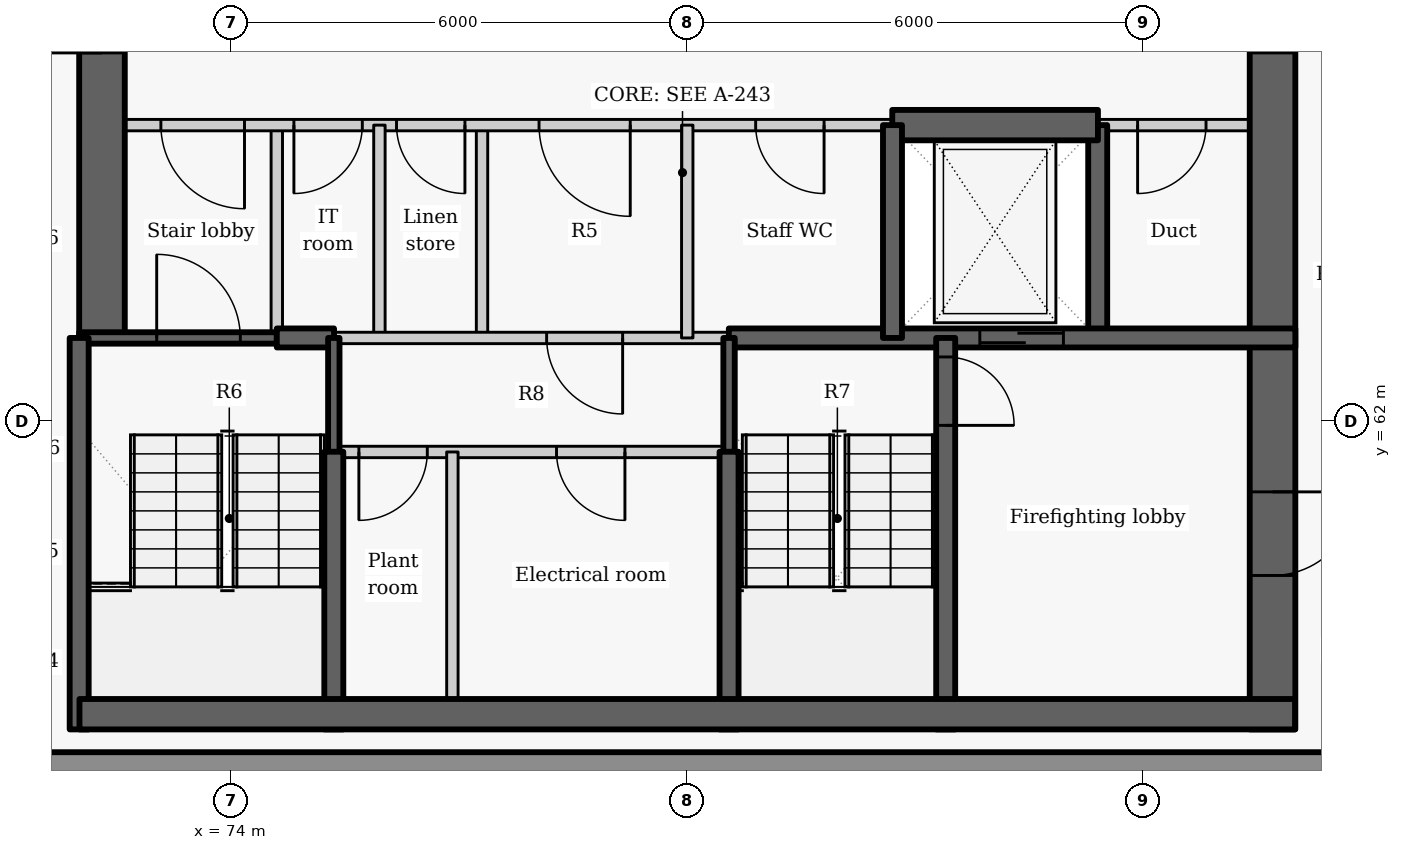
"""IFC4 building model, lengths in metres.
Left out: names, types, materials, properties, quantities, classifications, styles, units other than length and angle.
Written with IfcOpenShell. Run it as: python <this file> out.ifc"""

import sys

from ifc_helpers import new_model, si_unit, direction, frame, frame_2d, origin, place, context, subcontext, project, spatial, rectangle, extrude, element, fill, save


model = new_model("IFC4")
c1 = context("Model", 3, precision=1e-05, world=origin(), true_north=direction((0.0, 1.0)))
c2 = subcontext(c1, "Body", "Model", "MODEL_VIEW")
j1 = project(units=[si_unit("LENGTHUNIT", "METRE"), si_unit("PLANEANGLEUNIT", "RADIAN")], contexts=[c1])
p1 = place(None, origin())
s1 = spatial("IfcSite", under=j1, at=p1, CompositionType="ELEMENT")
p2 = place(p1, origin())
s2 = spatial("IfcBuilding", under=s1, at=p2, CompositionType="ELEMENT")
p3 = place(p2, frame((0.0, 0.0, 259.2)))
s3 = spatial("IfcBuildingStorey", under=s2, at=p3, CompositionType="ELEMENT", Elevation=259.2)
p4 = place(p3, frame((70.501, 57.5, 0.0), z_axis=(0.0, 0.0, 1.0), x_axis=(1.0, 0.0, 0.0)))
e1 = element("IfcWall", 1, at=p4, inside=s3, PredefinedType="SOLIDWALL", context=c2, shape_type="SweptSolid", body=[
    extrude(rectangle(XDim=18.993, YDim=0.3, at=frame_2d((9.496, 0.0))), origin(), (0.0, 0.0, 1.0), 2.425),
])
p5 = place(p3, frame((74.6, 63.1, 0.0), z_axis=(0.0, 0.0, 1.0), x_axis=(0.0, 1.0, 0.0)))
e2 = element("IfcWall", 2, at=p5, inside=s3, PredefinedType="PARTITIONING", context=c2, shape_type="SweptSolid", body=[
    extrude(rectangle(XDim=2.8, YDim=0.15, at=frame_2d((1.4, 0.0))), origin(), (0.0, 0.0, 1.0), 3.025),
])
p6 = place(p3, frame((72.3, 63.1, -0.275), z_axis=(0.0, 0.0, 1.0), x_axis=(0.0, 1.0, 0.0)))
e3 = element("IfcWall", 3, at=p6, inside=s3, PredefinedType="SHEAR", context=c2, shape_type="SweptSolid", body=[
    extrude(rectangle(XDim=9.1, YDim=0.6, at=frame_2d((4.55, 0.0))), origin(), (0.0, 0.0, 1.0), 3.3),
])
p7 = place(p6, frame((3.75, 0.0, 0.275)))
e4 = element("IfcOpeningElement", 4, at=p7, cuts=e3, PredefinedType="OPENING", context=c2, shape_type="SweptSolid", body=[
    extrude(rectangle(XDim=1.5, YDim=2.1, at=frame_2d((0.75, 1.05))), frame((0.0, 0.31, 0.0), z_axis=(0.0, -1.0, 0.0), x_axis=(1.0, 0.0, 0.0)), (0.0, 0.0, 1.0), 0.62),
])
p8 = place(p3, frame((85.4, 63.1, -0.275), z_axis=(0.0, 0.0, 1.0), x_axis=(0.0, 1.0, 0.0)))
e5 = element("IfcWall", 5, at=p8, inside=s3, PredefinedType="SHEAR", context=c2, shape_type="SweptSolid", body=[
    extrude(rectangle(XDim=2.8, YDim=0.25, at=frame_2d((1.4, 0.0))), origin(), (0.0, 0.0, 1.0), 3.3),
])
p9 = place(p3, frame((87.7, 72.2, -0.275), z_axis=(0.0, 0.0, 1.0), x_axis=(0.0, -1.0, 0.0)))
e6 = element("IfcWall", 6, at=p9, inside=s3, PredefinedType="SHEAR", context=c2, shape_type="SweptSolid", body=[
    extrude(rectangle(XDim=14.25, YDim=0.6, at=frame_2d((7.125, 0.0))), origin(), (0.0, 0.0, 1.0), 3.3),
])
p10 = place(p9, frame((3.85, 0.0, 0.275)))
e7 = element("IfcOpeningElement", 7, at=p10, cuts=e6, PredefinedType="OPENING", context=c2, shape_type="SweptSolid", body=[
    extrude(rectangle(XDim=1.5, YDim=2.1, at=frame_2d((0.75, 1.05))), frame((0.0, 0.31, 0.0), z_axis=(0.0, -1.0, 0.0), x_axis=(1.0, 0.0, 0.0)), (0.0, 0.0, 1.0), 0.62),
])
p11 = place(p9, frame((11.125, 0.0, 0.275)))
e8 = element("IfcOpeningElement", 8, at=p11, cuts=e6, PredefinedType="OPENING", context=c2, shape_type="SweptSolid", body=[
    extrude(rectangle(XDim=1.1, YDim=2.1, at=frame_2d((0.55, 1.05))), frame((0.0, 0.31, 0.0), z_axis=(0.0, -1.0, 0.0), x_axis=(1.0, 0.0, 0.0)), (0.0, 0.0, 1.0), 0.62),
])
p12 = place(p3, frame((77.3, 63.1, 0.0), z_axis=(0.0, 0.0, 1.0), x_axis=(0.0, 1.0, 0.0)))
e9 = element("IfcWall", 9, at=p12, inside=s3, PredefinedType="PARTITIONING", context=c2, shape_type="SweptSolid", body=[
    extrude(rectangle(XDim=2.8, YDim=0.15, at=frame_2d((1.4, 0.0))), origin(), (0.0, 0.0, 1.0), 3.025),
])
p13 = place(p3, frame((82.703, 65.9, 0.0), z_axis=(0.0, 0.0, 1.0), x_axis=(-1.0, 0.0, 0.0)))
e10 = element("IfcWall", 10, at=p13, inside=s3, PredefinedType="PARTITIONING", context=c2, shape_type="SweptSolid", body=[
    extrude(rectangle(XDim=10.703, YDim=0.15, at=frame_2d((5.352, 0.0))), origin(), (0.0, 0.0, 1.0), 3.025),
])
p14 = place(p13, frame((8.528, 0.0, 0.0)))
e11 = element("IfcOpeningElement", 11, at=p14, cuts=e10, PredefinedType="OPENING", context=c2, shape_type="SweptSolid", body=[
    extrude(rectangle(XDim=1.1, YDim=2.1, at=frame_2d((0.55, 1.05))), frame((0.0, 0.085, 0.0), z_axis=(0.0, -1.0, 0.0), x_axis=(1.0, 0.0, 0.0)), (0.0, 0.0, 1.0), 0.17),
])
p15 = place(p13, frame((6.978, 0.0, 0.0)))
e12 = element("IfcOpeningElement", 12, at=p15, cuts=e10, PredefinedType="OPENING", context=c2, shape_type="SweptSolid", body=[
    extrude(rectangle(XDim=0.9, YDim=2.1, at=frame_2d((0.45, 1.05))), frame((0.0, 0.085, 0.0), z_axis=(0.0, -1.0, 0.0), x_axis=(1.0, 0.0, 0.0)), (0.0, 0.0, 1.0), 0.17),
])
p16 = place(p13, frame((5.628, 0.0, 0.0)))
e13 = element("IfcOpeningElement", 13, at=p16, cuts=e10, PredefinedType="OPENING", context=c2, shape_type="SweptSolid", body=[
    extrude(rectangle(XDim=0.9, YDim=2.1, at=frame_2d((0.45, 1.05))), frame((0.0, 0.085, 0.0), z_axis=(0.0, -1.0, 0.0), x_axis=(1.0, 0.0, 0.0)), (0.0, 0.0, 1.0), 0.17),
])
p17 = place(p13, frame((3.453, 0.0, 0.0)))
e14 = element("IfcOpeningElement", 14, at=p17, cuts=e10, PredefinedType="OPENING", context=c2, shape_type="SweptSolid", body=[
    extrude(rectangle(XDim=1.2, YDim=2.1, at=frame_2d((0.6, 1.05))), frame((0.0, 0.085, 0.0), z_axis=(0.0, -1.0, 0.0), x_axis=(1.0, 0.0, 0.0)), (0.0, 0.0, 1.0), 0.17),
])
p18 = place(p13, frame((0.903, 0.0, 0.0)))
e15 = element("IfcOpeningElement", 15, at=p18, cuts=e10, PredefinedType="OPENING", context=c2, shape_type="SweptSolid", body=[
    extrude(rectangle(XDim=0.9, YDim=2.1, at=frame_2d((0.45, 1.05))), frame((0.0, 0.085, 0.0), z_axis=(0.0, -1.0, 0.0), x_axis=(1.0, 0.0, 0.0)), (0.0, 0.0, 1.0), 0.17),
])
p19 = place(p3, frame((88.0, 65.9, 0.0), z_axis=(0.0, 0.0, 1.0), x_axis=(-1.0, 0.0, 0.0)))
e16 = element("IfcWall", 16, at=p19, inside=s3, PredefinedType="PARTITIONING", context=c2, shape_type="SweptSolid", body=[
    extrude(rectangle(XDim=2.603, YDim=0.15, at=frame_2d((1.302, 0.0))), origin(), (0.0, 0.0, 1.0), 3.025),
])
p20 = place(p19, frame((1.175, 0.0, 0.0)))
e17 = element("IfcOpeningElement", 17, at=p20, cuts=e16, PredefinedType="OPENING", context=c2, shape_type="SweptSolid", body=[
    extrude(rectangle(XDim=0.9, YDim=2.1, at=frame_2d((0.45, 1.05))), frame((0.0, 0.085, 0.0), z_axis=(0.0, -1.0, 0.0), x_axis=(1.0, 0.0, 0.0)), (0.0, 0.0, 1.0), 0.17),
])
p21 = place(p3, frame((82.697, 65.9, -0.275), z_axis=(0.0, 0.0, 1.0), x_axis=(1.0, 0.0, 0.0)))
e18 = element("IfcWall", 18, at=p21, inside=s3, PredefinedType="SHEAR", context=c2, shape_type="SweptSolid", body=[
    extrude(rectangle(XDim=2.706, YDim=0.4, at=frame_2d((1.353, 0.0))), origin(), (0.0, 0.0, 1.0), 3.3),
])
p22 = place(p3, frame((72.0, 63.1, -0.275), z_axis=(0.0, 0.0, 1.0), x_axis=(1.0, 0.0, 0.0)))
e19 = element("IfcWall", 19, at=p22, inside=s3, PredefinedType="SHEAR", context=c2, shape_type="SweptSolid", body=[
    extrude(rectangle(XDim=2.6, YDim=0.15, at=frame_2d((1.3, 0.0))), origin(), (0.0, 0.0, 1.0), 3.3),
])
p23 = place(p22, frame((1.02, 0.0, 0.275)))
e20 = element("IfcOpeningElement", 20, at=p23, cuts=e19, PredefinedType="OPENING", context=c2, shape_type="SweptSolid", body=[
    extrude(rectangle(XDim=1.1, YDim=2.1, at=frame_2d((0.55, 1.05))), frame((0.0, 0.085, 0.0), z_axis=(0.0, -1.0, 0.0), x_axis=(1.0, 0.0, 0.0)), (0.0, 0.0, 1.0), 0.17),
])
p24 = place(p3, frame((75.95, 63.1, 0.0), z_axis=(0.0, 0.0, 1.0), x_axis=(0.0, 1.0, 0.0)))
e21 = element("IfcWall", 21, at=p24, inside=s3, PredefinedType="PARTITIONING", context=c2, shape_type="SweptSolid", body=[
    extrude(rectangle(XDim=2.8, YDim=0.15, at=frame_2d((1.4, 0.0))), origin(), (0.0, 0.0, 1.0), 3.025),
])
p25 = place(p3, frame((74.6, 63.1, -0.275), z_axis=(0.0, 0.0, 1.0), x_axis=(1.0, 0.0, 0.0)))
e22 = element("IfcWall", 22, at=p25, inside=s3, PredefinedType="SHEAR", context=c2, shape_type="SweptSolid", body=[
    extrude(rectangle(XDim=0.753, YDim=0.25, at=frame_2d((0.376, 0.0))), origin(), (0.0, 0.0, 1.0), 3.3),
])
p26 = place(p3, frame((80.547, 63.1, -0.275), z_axis=(0.0, 0.0, 1.0), x_axis=(1.0, 0.0, 0.0)))
e23 = element("IfcWall", 23, at=p26, inside=s3, PredefinedType="SHEAR", context=c2, shape_type="SweptSolid", body=[
    extrude(rectangle(XDim=7.453, YDim=0.25, at=frame_2d((3.727, 0.0))), origin(), (0.0, 0.0, 1.0), 3.3),
])
p27 = place(p26, frame((3.302, 0.0, 0.275)))
e24 = element("IfcOpeningElement", 24, at=p27, cuts=e23, PredefinedType="OPENING", context=c2, shape_type="SweptSolid", body=[
    extrude(rectangle(XDim=1.1, YDim=2.1, at=frame_2d((0.55, 1.05))), frame((0.0, 0.135, 0.0), z_axis=(0.0, -1.0, 0.0), x_axis=(1.0, 0.0, 0.0)), (0.0, 0.0, 1.0), 0.27),
])
p28 = place(p3, frame((80.553, 63.1, 0.0), z_axis=(0.0, 0.0, 1.0), x_axis=(-1.0, 0.0, 0.0)))
e25 = element("IfcWall", 25, at=p28, inside=s3, PredefinedType="PARTITIONING", context=c2, shape_type="SweptSolid", body=[
    extrude(rectangle(XDim=5.206, YDim=0.15, at=frame_2d((2.603, 0.0))), origin(), (0.0, 0.0, 1.0), 3.025),
])
p29 = place(p28, frame((1.403, 0.0, 0.0)))
e26 = element("IfcOpeningElement", 26, at=p29, cuts=e25, PredefinedType="OPENING", context=c2, shape_type="SweptSolid", body=[
    extrude(rectangle(XDim=1.0, YDim=2.1, at=frame_2d((0.5, 1.05))), frame((0.0, 0.085, 0.0), z_axis=(0.0, -1.0, 0.0), x_axis=(1.0, 0.0, 0.0)), (0.0, 0.0, 1.0), 0.17),
])
p30 = place(p3, frame((80.0, 63.1, 0.0), z_axis=(0.0, 0.0, 1.0), x_axis=(0.0, 1.0, 0.0)))
e27 = element("IfcWall", 27, at=p30, inside=s3, PredefinedType="PARTITIONING", context=c2, shape_type="SweptSolid", body=[
    extrude(rectangle(XDim=2.8, YDim=0.15, at=frame_2d((1.4, 0.0))), origin(), (0.0, 0.0, 1.0), 3.025),
])
p31 = place(p3, frame((82.7, 63.1, -0.275), z_axis=(0.0, 0.0, 1.0), x_axis=(0.0, 1.0, 0.0)))
e28 = element("IfcWall", 28, at=p31, inside=s3, PredefinedType="SHEAR", context=c2, shape_type="SweptSolid", body=[
    extrude(rectangle(XDim=2.8, YDim=0.25, at=frame_2d((1.4, 0.0))), origin(), (0.0, 0.0, 1.0), 3.3),
])
p32 = place(p3, frame((75.35, 61.597, -0.275), z_axis=(0.0, 0.0, 1.0), x_axis=(0.0, 1.0, 0.0)))
e29 = element("IfcWall", 29, at=p32, inside=s3, PredefinedType="SHEAR", context=c2, shape_type="SweptSolid", body=[
    extrude(rectangle(XDim=1.503, YDim=0.15, at=frame_2d((0.751, 0.0))), origin(), (0.0, 0.0, 1.0), 3.3),
])
p33 = place(p3, frame((75.35, 57.95, -0.275), z_axis=(0.0, 0.0, 1.0), x_axis=(0.0, 1.0, 0.0)))
e30 = element("IfcWall", 30, at=p33, inside=s3, PredefinedType="SHEAR", context=c2, shape_type="SweptSolid", body=[
    extrude(rectangle(XDim=3.653, YDim=0.25, at=frame_2d((1.827, 0.0))), origin(), (0.0, 0.0, 1.0), 3.3),
])
p34 = place(p3, frame((72.0, 57.95, -0.275), z_axis=(0.0, 0.0, 1.0), x_axis=(0.0, 1.0, 0.0)))
e31 = element("IfcWall", 31, at=p34, inside=s3, PredefinedType="SHEAR", context=c2, shape_type="SweptSolid", body=[
    extrude(rectangle(XDim=5.15, YDim=0.25, at=frame_2d((2.575, 0.0))), origin(), (0.0, 0.0, 1.0), 3.3),
])
p35 = place(p3, frame((83.4, 63.1, -0.275), z_axis=(0.0, 0.0, 1.0), x_axis=(0.0, -1.0, 0.0)))
e32 = element("IfcWall", 32, at=p35, inside=s3, PredefinedType="SHEAR", context=c2, shape_type="SweptSolid", body=[
    extrude(rectangle(XDim=5.15, YDim=0.25, at=frame_2d((2.575, 0.0))), origin(), (0.0, 0.0, 1.0), 3.3),
])
p36 = place(p35, frame((0.25, 0.0, 0.275)))
e33 = element("IfcOpeningElement", 33, at=p36, cuts=e32, PredefinedType="OPENING", context=c2, shape_type="SweptSolid", body=[
    extrude(rectangle(XDim=0.9, YDim=2.1, at=frame_2d((0.45, 1.05))), frame((0.0, 0.135, 0.0), z_axis=(0.0, -1.0, 0.0), x_axis=(1.0, 0.0, 0.0)), (0.0, 0.0, 1.0), 0.27),
])
p37 = place(p3, frame((80.55, 61.597, -0.275), z_axis=(0.0, 0.0, 1.0), x_axis=(0.0, 1.0, 0.0)))
e34 = element("IfcWall", 34, at=p37, inside=s3, PredefinedType="SHEAR", context=c2, shape_type="SweptSolid", body=[
    extrude(rectangle(XDim=1.503, YDim=0.15, at=frame_2d((0.751, 0.0))), origin(), (0.0, 0.0, 1.0), 3.3),
])
p38 = place(p3, frame((80.55, 57.95, -0.275), z_axis=(0.0, 0.0, 1.0), x_axis=(0.0, 1.0, 0.0)))
e35 = element("IfcWall", 35, at=p38, inside=s3, PredefinedType="SHEAR", context=c2, shape_type="SweptSolid", body=[
    extrude(rectangle(XDim=3.653, YDim=0.25, at=frame_2d((1.827, 0.0))), origin(), (0.0, 0.0, 1.0), 3.3),
])
p39 = place(p3, frame((80.55, 61.6, 0.0), z_axis=(0.0, 0.0, 1.0), x_axis=(-1.0, 0.0, 0.0)))
e36 = element("IfcWall", 36, at=p39, inside=s3, PredefinedType="PARTITIONING", context=c2, shape_type="SweptSolid", body=[
    extrude(rectangle(XDim=5.2, YDim=0.15, at=frame_2d((2.6, 0.0))), origin(), (0.0, 0.0, 1.0), 3.025),
])
p40 = place(p39, frame((3.97, 0.0, 0.0)))
e37 = element("IfcOpeningElement", 37, at=p40, cuts=e36, PredefinedType="OPENING", context=c2, shape_type="SweptSolid", body=[
    extrude(rectangle(XDim=0.9, YDim=2.1, at=frame_2d((0.45, 1.05))), frame((0.0, 0.085, 0.0), z_axis=(0.0, -1.0, 0.0), x_axis=(1.0, 0.0, 0.0)), (0.0, 0.0, 1.0), 0.17),
])
p41 = place(p39, frame((1.37, 0.0, 0.0)))
e38 = element("IfcOpeningElement", 38, at=p41, cuts=e36, PredefinedType="OPENING", context=c2, shape_type="SweptSolid", body=[
    extrude(rectangle(XDim=0.9, YDim=2.1, at=frame_2d((0.45, 1.05))), frame((0.0, 0.085, 0.0), z_axis=(0.0, -1.0, 0.0), x_axis=(1.0, 0.0, 0.0)), (0.0, 0.0, 1.0), 0.17),
])
p42 = place(p3, frame((76.91, 57.95, 0.0), z_axis=(0.0, 0.0, 1.0), x_axis=(0.0, 1.0, 0.0)))
e39 = element("IfcWall", 39, at=p42, inside=s3, PredefinedType="PARTITIONING", context=c2, shape_type="SweptSolid", body=[
    extrude(rectangle(XDim=3.65, YDim=0.15, at=frame_2d((1.825, 0.0))), origin(), (0.0, 0.0, 1.0), 3.025),
])
p43 = place(p3, frame((72.004, 58.15, -0.275), z_axis=(0.0, 0.0, 1.0), x_axis=(1.0, 0.0, 0.0)))
e40 = element("IfcWall", 40, at=p43, inside=s3, PredefinedType="SHEAR", context=c2, shape_type="SweptSolid", body=[
    extrude(rectangle(XDim=15.992, YDim=0.4, at=frame_2d((7.996, 0.0))), origin(), (0.0, 0.0, 1.0), 3.3),
])
p44 = place(p14, origin())
e41 = element("IfcDoor", 41, at=p44, inside=s3, OperationType="SINGLE_SWING_LEFT", PredefinedType="DOOR", context=c2, shape_type="SweptSolid", body=[
    extrude(rectangle(XDim=1.1, YDim=2.1, at=frame_2d((0.55, 1.05))), frame((0.0, 0.025, 0.0), z_axis=(0.0, -1.0, 0.0), x_axis=(1.0, 0.0, 0.0)), (0.0, 0.0, 1.0), 0.05),
])
fill(e11, e41)
p45 = place(p15, origin())
e42 = element("IfcDoor", 42, at=p45, inside=s3, OperationType="SINGLE_SWING_RIGHT", PredefinedType="DOOR", context=c2, shape_type="SweptSolid", body=[
    extrude(rectangle(XDim=0.9, YDim=2.1, at=frame_2d((0.45, 1.05))), frame((0.0, 0.025, 0.0), z_axis=(0.0, -1.0, 0.0), x_axis=(1.0, 0.0, 0.0)), (0.0, 0.0, 1.0), 0.05),
])
fill(e12, e42)
p46 = place(p16, origin())
e43 = element("IfcDoor", 43, at=p46, inside=s3, OperationType="SINGLE_SWING_LEFT", PredefinedType="DOOR", context=c2, shape_type="SweptSolid", body=[
    extrude(rectangle(XDim=0.9, YDim=2.1, at=frame_2d((0.45, 1.05))), frame((0.0, 0.025, 0.0), z_axis=(0.0, -1.0, 0.0), x_axis=(1.0, 0.0, 0.0)), (0.0, 0.0, 1.0), 0.05),
])
fill(e13, e43)
p47 = place(p17, origin())
e44 = element("IfcDoor", 44, at=p47, inside=s3, OperationType="DOUBLE_DOOR_SINGLE_SWING", PredefinedType="DOOR", context=c2, shape_type="SweptSolid", body=[
    extrude(rectangle(XDim=1.2, YDim=2.1, at=frame_2d((0.6, 1.05))), frame((0.0, 0.025, 0.0), z_axis=(0.0, -1.0, 0.0), x_axis=(1.0, 0.0, 0.0)), (0.0, 0.0, 1.0), 0.05),
])
fill(e14, e44)
p48 = place(p18, origin())
e45 = element("IfcDoor", 45, at=p48, inside=s3, OperationType="SINGLE_SWING_LEFT", PredefinedType="DOOR", context=c2, shape_type="SweptSolid", body=[
    extrude(rectangle(XDim=0.9, YDim=2.1, at=frame_2d((0.45, 1.05))), frame((0.0, 0.025, 0.0), z_axis=(0.0, -1.0, 0.0), x_axis=(1.0, 0.0, 0.0)), (0.0, 0.0, 1.0), 0.05),
])
fill(e15, e45)
p49 = place(p27, origin())
e46 = element("IfcDoor", 46, at=p49, inside=s3, OperationType="SLIDING_TO_LEFT", PredefinedType="DOOR", context=c2, shape_type="SweptSolid", body=[
    extrude(rectangle(XDim=1.1, YDim=2.1, at=frame_2d((0.55, 1.05))), frame((0.0, 0.025, 0.0), z_axis=(0.0, -1.0, 0.0), x_axis=(1.0, 0.0, 0.0)), (0.0, 0.0, 1.0), 0.05),
])
fill(e24, e46)
p50 = place(p20, origin())
e47 = element("IfcDoor", 47, at=p50, inside=s3, OperationType="SINGLE_SWING_RIGHT", PredefinedType="DOOR", context=c2, shape_type="SweptSolid", body=[
    extrude(rectangle(XDim=0.9, YDim=2.1, at=frame_2d((0.45, 1.05))), frame((0.0, 0.025, 0.0), z_axis=(0.0, -1.0, 0.0), x_axis=(1.0, 0.0, 0.0)), (0.0, 0.0, 1.0), 0.05),
])
fill(e17, e47)
p51 = place(p29, origin())
e48 = element("IfcDoor", 48, at=p51, inside=s3, OperationType="SINGLE_SWING_LEFT", PredefinedType="DOOR", context=c2, shape_type="SweptSolid", body=[
    extrude(rectangle(XDim=1.0, YDim=2.1, at=frame_2d((0.5, 1.05))), frame((0.0, 0.025, 0.0), z_axis=(0.0, -1.0, 0.0), x_axis=(1.0, 0.0, 0.0)), (0.0, 0.0, 1.0), 0.05),
])
fill(e26, e48)
p52 = place(p40, origin())
e49 = element("IfcDoor", 49, at=p52, inside=s3, OperationType="SINGLE_SWING_RIGHT", PredefinedType="DOOR", context=c2, shape_type="SweptSolid", body=[
    extrude(rectangle(XDim=0.9, YDim=2.1, at=frame_2d((0.45, 1.05))), frame((0.0, 0.025, 0.0), z_axis=(0.0, -1.0, 0.0), x_axis=(1.0, 0.0, 0.0)), (0.0, 0.0, 1.0), 0.05),
])
fill(e37, e49)
p53 = place(p41, origin())
e50 = element("IfcDoor", 50, at=p53, inside=s3, OperationType="SINGLE_SWING_LEFT", PredefinedType="DOOR", context=c2, shape_type="SweptSolid", body=[
    extrude(rectangle(XDim=0.9, YDim=2.1, at=frame_2d((0.45, 1.05))), frame((0.0, 0.025, 0.0), z_axis=(0.0, -1.0, 0.0), x_axis=(1.0, 0.0, 0.0)), (0.0, 0.0, 1.0), 0.05),
])
fill(e38, e50)
p54 = place(p23, origin())
e51 = element("IfcDoor", 51, at=p54, inside=s3, OperationType="SINGLE_SWING_LEFT", PredefinedType="DOOR", context=c2, shape_type="SweptSolid", body=[
    extrude(rectangle(XDim=1.1, YDim=2.1, at=frame_2d((0.55, 1.05))), frame((0.0, 0.025, 0.0), z_axis=(0.0, -1.0, 0.0), x_axis=(1.0, 0.0, 0.0)), (0.0, 0.0, 1.0), 0.05),
])
fill(e20, e51)
p55 = place(p36, origin())
e52 = element("IfcDoor", 52, at=p55, inside=s3, OperationType="SINGLE_SWING_RIGHT", PredefinedType="DOOR", context=c2, shape_type="SweptSolid", body=[
    extrude(rectangle(XDim=0.9, YDim=2.1, at=frame_2d((0.45, 1.05))), frame((0.0, 0.025, 0.0), z_axis=(0.0, -1.0, 0.0), x_axis=(1.0, 0.0, 0.0)), (0.0, 0.0, 1.0), 0.05),
])
fill(e33, e52)
p56 = place(p10, origin())
e53 = element("IfcDoor", 53, at=p56, inside=s3, OperationType="DOUBLE_DOOR_SINGLE_SWING", PredefinedType="DOOR", context=c2, shape_type="SweptSolid", body=[
    extrude(rectangle(XDim=1.5, YDim=2.1, at=frame_2d((0.75, 1.05))), frame((0.0, 0.025, 0.0), z_axis=(0.0, -1.0, 0.0), x_axis=(1.0, 0.0, 0.0)), (0.0, 0.0, 1.0), 0.05),
])
fill(e7, e53)
p57 = place(p11, origin())
e54 = element("IfcDoor", 54, at=p57, inside=s3, OperationType="SINGLE_SWING_LEFT", PredefinedType="DOOR", context=c2, shape_type="SweptSolid", body=[
    extrude(rectangle(XDim=1.1, YDim=2.1, at=frame_2d((0.55, 1.05))), frame((0.0, 0.025, 0.0), z_axis=(0.0, -1.0, 0.0), x_axis=(1.0, 0.0, 0.0)), (0.0, 0.0, 1.0), 0.05),
])
fill(e8, e54)
save(model, sys.argv[1])
